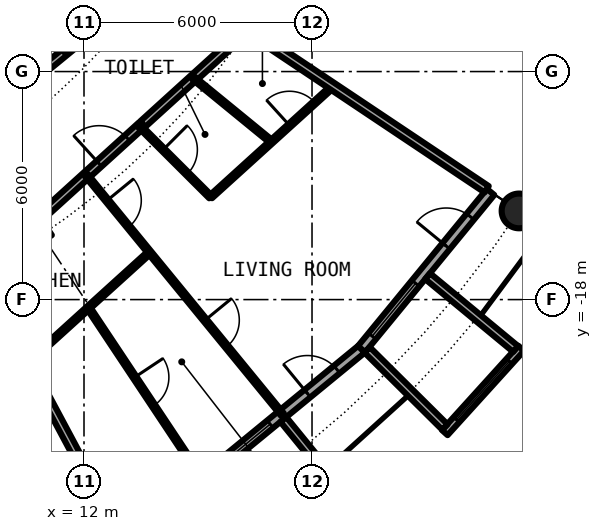
"""IFC4 building model, lengths in metres.
Left out: names, types, materials, properties, quantities, classifications, styles, units other than length and angle.
Written with IfcOpenShell. Run it as: python <this file> out.ifc"""

import sys

from ifc_helpers import new_model, si_unit, direction, frame, frame_2d, origin, origin_2d, place, context, subcontext, project, spatial, rectangle, circle, hollow_circle, extrude, element, fill, save


model = new_model("IFC4")
c1 = context("Model", 3, precision=1e-05, world=origin(), true_north=direction((0.0, 1.0)))
c2 = subcontext(c1, "Body", "Model", "MODEL_VIEW")
j1 = project(units=[si_unit("LENGTHUNIT", "METRE"), si_unit("PLANEANGLEUNIT", "RADIAN")], contexts=[c1])
p1 = place(None, origin())
s1 = spatial("IfcSite", under=j1, at=p1, CompositionType="ELEMENT")
p2 = place(p1, origin())
s2 = spatial("IfcBuilding", under=s1, at=p2, CompositionType="ELEMENT")
p3 = place(p2, frame((0.0, 0.0, 129.95)))
s3 = spatial("IfcBuildingStorey", under=s2, at=p3, CompositionType="ELEMENT", Elevation=129.95)
p4 = place(p3, frame((23.448, -15.667, 0.0), z_axis=(0.0, 0.0, 1.0), x_axis=(1.0, 0.0, 0.0)))
e1 = element("IfcColumn", 1, at=p4, inside=s3, PredefinedType="COLUMN", context=c2, shape_type="SweptSolid", body=[
    extrude(hollow_circle(Radius=0.457, WallThickness=0.04, at=origin_2d()), origin(), (0.0, 0.0, 1.0), 3.05),
])
p5 = place(p3, frame((15.167, -22.699, 0.0), z_axis=(0.0, 0.0, 1.0), x_axis=(0.773019449054, 0.634382322723, 0.0)))
e2 = element("IfcWall", 2, at=p5, inside=s3, PredefinedType="SOLIDWALL", context=c2, shape_type="SweptSolid", body=[
    extrude(rectangle(XDim=5.352, YDim=0.25, at=frame_2d((2.676, 0.0))), origin(), (0.0, 0.0, 1.0), 2.7),
])
p6 = place(p5, frame((0.441, 0.0, 0.3)))
e3 = element("IfcOpeningElement", 3, at=p6, cuts=e2, PredefinedType="OPENING", context=c2, shape_type="SweptSolid", body=[
    extrude(rectangle(XDim=1.8, YDim=2.1, at=frame_2d((0.9, 1.05))), frame((0.0, 0.135, 0.0), z_axis=(0.0, -1.0, 0.0), x_axis=(1.0, 0.0, 0.0)), (0.0, 0.0, 1.0), 0.27),
])
p7 = place(p5, frame((3.51, 0.0, 0.0)))
e4 = element("IfcOpeningElement", 4, at=p7, cuts=e2, PredefinedType="OPENING", context=c2, shape_type="SweptSolid", body=[
    extrude(rectangle(XDim=1.0, YDim=2.2, at=frame_2d((0.5, 1.1))), frame((0.0, 0.135, 0.0), z_axis=(0.0, -1.0, 0.0), x_axis=(1.0, 0.0, 0.0)), (0.0, 0.0, 1.0), 0.27),
])
p8 = place(p3, frame((17.246, -21.155, -0.03), z_axis=(0.0, 0.0, 1.0), x_axis=(0.631741648902, -0.775179004516, 0.0)))
e5 = element("IfcWall", 5, at=p8, inside=s3, PredefinedType="SOLIDWALL", context=c2, shape_type="SweptSolid", body=[
    extrude(rectangle(XDim=3.006, YDim=0.2, at=frame_2d((1.503, 0.0))), origin(), (0.0, 0.0, 1.0), 2.73),
])
p9 = place(p3, frame((19.304, -19.304, 0.0), z_axis=(0.0, 0.0, 1.0), x_axis=(0.634382322723, 0.773019449054, 0.0)))
e6 = element("IfcWall", 6, at=p9, inside=s3, PredefinedType="SOLIDWALL", context=c2, shape_type="SweptSolid", body=[
    extrude(rectangle(XDim=5.352, YDim=0.25, at=frame_2d((2.676, 0.0))), origin(), (0.0, 0.0, 1.0), 2.7),
])
p10 = place(p9, frame((0.441, 0.0, 0.3)))
e7 = element("IfcOpeningElement", 7, at=p10, cuts=e6, PredefinedType="OPENING", context=c2, shape_type="SweptSolid", body=[
    extrude(rectangle(XDim=1.8, YDim=2.1, at=frame_2d((0.9, 1.05))), frame((0.0, 0.135, 0.0), z_axis=(0.0, -1.0, 0.0), x_axis=(1.0, 0.0, 0.0)), (0.0, 0.0, 1.0), 0.27),
])
p11 = place(p9, frame((3.51, 0.0, 0.0)))
e8 = element("IfcOpeningElement", 8, at=p11, cuts=e6, PredefinedType="OPENING", context=c2, shape_type="SweptSolid", body=[
    extrude(rectangle(XDim=1.0, YDim=2.2, at=frame_2d((0.5, 1.1))), frame((0.0, 0.135, 0.0), z_axis=(0.0, -1.0, 0.0), x_axis=(1.0, 0.0, 0.0)), (0.0, 0.0, 1.0), 0.27),
])
p12 = place(p3, frame((21.493, -21.5, -0.03), z_axis=(0.0, 0.0, 1.0), x_axis=(0.671506829416, 0.740998365753, 0.0)))
e9 = element("IfcWall", 9, at=p12, inside=s3, PredefinedType="SOLIDWALL", context=c2, shape_type="SweptSolid", body=[
    extrude(rectangle(XDim=2.993, YDim=0.2, at=frame_2d((1.497, 0.0))), origin(), (0.0, 0.0, 1.0), 2.73),
])
p13 = place(p12, frame((0.457, 0.0, 0.33)))
e10 = element("IfcOpeningElement", 10, at=p13, cuts=e9, PredefinedType="OPENING", context=c2, shape_type="SweptSolid", body=[
    extrude(circle(Radius=1.04, at=frame_2d((1.04, 1.04))), frame((0.0, 0.11, 0.0), z_axis=(0.0, -1.0, 0.0), x_axis=(1.0, 0.0, 0.0)), (0.0, 0.0, 1.0), 0.22),
])
p14 = place(p3, frame((19.45, -19.323, -0.03), z_axis=(0.0, 0.0, 1.0), x_axis=(0.709727076896, -0.704476739375, 0.0)))
e11 = element("IfcWall", 11, at=p14, inside=s3, PredefinedType="SOLIDWALL", context=c2, shape_type="SweptSolid", body=[
    extrude(rectangle(XDim=2.883, YDim=0.2, at=frame_2d((1.441, 0.0))), origin(), (0.0, 0.0, 1.0), 2.73),
])
p15 = place(p3, frame((21.041, -17.384, -0.03), z_axis=(0.0, 0.0, 1.0), x_axis=(0.770784861449, -0.63709551667, 0.0)))
e12 = element("IfcWall", 12, at=p15, inside=s3, PredefinedType="SOLIDWALL", context=c2, shape_type="SweptSolid", body=[
    extrude(rectangle(XDim=3.006, YDim=0.2, at=frame_2d((1.503, 0.0))), origin(), (0.0, 0.0, 1.0), 2.73),
])
p16 = place(p3, frame((10.513, -19.668, 0.0), z_axis=(0.0, 0.0, 1.0), x_axis=(0.74092137325, 0.671591779775, 0.0)))
e13 = element("IfcWall", 13, at=p16, inside=s3, PredefinedType="PARTITIONING", context=c2, shape_type="SweptSolid", body=[
    extrude(rectangle(XDim=4.342, YDim=0.1, at=frame_2d((2.171, 0.0))), origin(), (0.0, 0.0, 1.0), 2.7),
])
p17 = place(p3, frame((15.336, -15.296, 0.0), z_axis=(0.0, 0.0, 1.0), x_axis=(0.740895789277, 0.671620003746, 0.0)))
e14 = element("IfcWall", 14, at=p17, inside=s3, PredefinedType="PARTITIONING", context=c2, shape_type="SweptSolid", body=[
    extrude(rectangle(XDim=4.331, YDim=0.1, at=frame_2d((2.166, 0.0))), origin(), (0.0, 0.0, 1.0), 2.7),
])
p18 = place(p17, frame((2.796, 0.0, 0.0)))
e15 = element("IfcOpeningElement", 15, at=p18, cuts=e14, PredefinedType="OPENING", context=c2, shape_type="SweptSolid", body=[
    extrude(rectangle(XDim=0.9, YDim=2.3, at=frame_2d((0.45, 1.15))), frame((0.0, 0.06, 0.0), z_axis=(0.0, -1.0, 0.0), x_axis=(1.0, 0.0, 0.0)), (0.0, 0.0, 1.0), 0.12),
])
p19 = place(p3, frame((9.249, -17.282, 0.0), z_axis=(0.0, 0.0, 1.0), x_axis=(0.740525495356, 0.672028266316, 0.0)))
e16 = element("IfcWall", 16, at=p19, inside=s3, PredefinedType="PARTITIONING", context=c2, shape_type="SweptSolid", body=[
    extrude(rectangle(XDim=5.753, YDim=0.2, at=frame_2d((2.876, 0.0))), origin(), (0.0, 0.0, 1.0), 2.7),
])
p20 = place(p19, frame((4.253, 0.0, 0.0)))
e17 = element("IfcOpeningElement", 17, at=p20, cuts=e16, PredefinedType="OPENING", context=c2, shape_type="SweptSolid", body=[
    extrude(rectangle(XDim=1.0, YDim=2.3, at=frame_2d((0.5, 1.15))), frame((0.0, 0.11, 0.0), z_axis=(0.0, -1.0, 0.0), x_axis=(1.0, 0.0, 0.0)), (0.0, 0.0, 1.0), 0.22),
])
p21 = place(p3, frame((13.545, -13.384, 0.0), z_axis=(0.0, 0.0, 1.0), x_axis=(0.740607766684, 0.671937598239, 0.0)))
e18 = element("IfcWall", 18, at=p21, inside=s3, PredefinedType="PARTITIONING", context=c2, shape_type="SweptSolid", body=[
    extrude(rectangle(XDim=3.555, YDim=0.2, at=frame_2d((1.778, 0.0))), origin(), (0.0, 0.0, 1.0), 2.39),
])
p22 = place(p3, frame((6.467, -15.614, 0.0), z_axis=(0.0, 0.0, 1.0), x_axis=(0.773074935257, 0.634314704605, 0.0)))
e19 = element("IfcWall", 19, at=p22, inside=s3, PredefinedType="PARTITIONING", context=c2, shape_type="SweptSolid", body=[
    extrude(rectangle(XDim=9.809, YDim=0.2, at=frame_2d((4.904, 0.0))), origin(), (0.0, 0.0, 1.0), 2.7),
])
p23 = place(p22, frame((4.407, 0.0, 0.0)))
e20 = element("IfcOpeningElement", 20, at=p23, cuts=e19, PredefinedType="OPENING", context=c2, shape_type="SweptSolid", body=[
    extrude(rectangle(XDim=1.0, YDim=2.3, at=frame_2d((0.5, 1.15))), frame((0.0, 0.11, 0.0), z_axis=(0.0, -1.0, 0.0), x_axis=(1.0, 0.0, 0.0)), (0.0, 0.0, 1.0), 0.22),
])
p24 = place(p3, frame((9.239, -17.286, 0.0), z_axis=(0.0, 0.0, 1.0), x_axis=(0.471439510802, -0.881898399848, 0.0)))
e21 = element("IfcWall", 21, at=p24, inside=s3, PredefinedType="PARTITIONING", context=c2, shape_type="SweptSolid", body=[
    extrude(rectangle(XDim=7.575, YDim=0.2, at=frame_2d((3.787, 0.0))), origin(), (0.0, 0.0, 1.0), 2.7),
])
p25 = place(p3, frame((9.683, -9.632, 0.0), z_axis=(0.0, 0.0, 1.0), x_axis=(0.708796844581, -0.705412668665, 0.0)))
e22 = element("IfcWall", 22, at=p25, inside=s3, PredefinedType="PARTITIONING", context=c2, shape_type="SweptSolid", body=[
    extrude(rectangle(XDim=2.597, YDim=0.1, at=frame_2d((1.299, 0.0))), origin(), (0.0, 0.0, 1.0), 2.7),
])
p26 = place(p25, frame((0.849, 0.0, 0.0)))
e23 = element("IfcOpeningElement", 23, at=p26, cuts=e22, PredefinedType="OPENING", context=c2, shape_type="SweptSolid", body=[
    extrude(rectangle(XDim=0.9, YDim=2.3, at=frame_2d((0.45, 1.15))), frame((0.0, 0.06, 0.0), z_axis=(0.0, -1.0, 0.0), x_axis=(1.0, 0.0, 0.0)), (0.0, 0.0, 1.0), 0.12),
])
p27 = place(p3, frame((12.062, -14.727, 0.0), z_axis=(0.0, 0.0, 1.0), x_axis=(0.633664062855, -0.773608334654, 0.0)))
e24 = element("IfcWall", 24, at=p27, inside=s3, PredefinedType="PARTITIONING", context=c2, shape_type="SweptSolid", body=[
    extrude(rectangle(XDim=8.138, YDim=0.1, at=frame_2d((4.069, 0.0))), origin(), (0.0, 0.0, 1.0), 2.7),
])
p28 = place(p27, frame((0.861, 0.0, 0.0)))
e25 = element("IfcOpeningElement", 25, at=p28, cuts=e24, PredefinedType="OPENING", context=c2, shape_type="SweptSolid", body=[
    extrude(rectangle(XDim=0.9, YDim=2.3, at=frame_2d((0.45, 1.15))), frame((0.0, 0.06, 0.0), z_axis=(0.0, -1.0, 0.0), x_axis=(1.0, 0.0, 0.0)), (0.0, 0.0, 1.0), 0.12),
])
p29 = place(p27, frame((4.931, 0.0, 0.0)))
e26 = element("IfcOpeningElement", 26, at=p29, cuts=e24, PredefinedType="OPENING", context=c2, shape_type="SweptSolid", body=[
    extrude(rectangle(XDim=0.9, YDim=2.3, at=frame_2d((0.45, 1.15))), frame((0.0, 0.06, 0.0), z_axis=(0.0, -1.0, 0.0), x_axis=(1.0, 0.0, 0.0)), (0.0, 0.0, 1.0), 0.12),
])
p30 = place(p3, frame((12.115, -18.213, 0.0), z_axis=(0.0, 0.0, 1.0), x_axis=(0.553913391217, -0.832574294, 0.0)))
e27 = element("IfcWall", 27, at=p30, inside=s3, PredefinedType="PARTITIONING", context=c2, shape_type="SweptSolid", body=[
    extrude(rectangle(XDim=5.301, YDim=0.1, at=frame_2d((2.65, 0.0))), origin(), (0.0, 0.0, 1.0), 2.7),
])
p31 = place(p30, frame((2.2, 0.0, 0.0)))
e28 = element("IfcOpeningElement", 28, at=p31, cuts=e27, PredefinedType="OPENING", context=c2, shape_type="SweptSolid", body=[
    extrude(rectangle(XDim=0.9, YDim=2.3, at=frame_2d((0.45, 1.15))), frame((0.0, 0.06, 0.0), z_axis=(0.0, -1.0, 0.0), x_axis=(1.0, 0.0, 0.0)), (0.0, 0.0, 1.0), 0.12),
])
p32 = place(p3, frame((13.474, -13.448, 0.0), z_axis=(0.0, 0.0, 1.0), x_axis=(0.707851299421, -0.706361478217, 0.0)))
e29 = element("IfcWall", 29, at=p32, inside=s3, PredefinedType="PARTITIONING", context=c2, shape_type="SweptSolid", body=[
    extrude(rectangle(XDim=2.622, YDim=0.1, at=frame_2d((1.311, 0.0))), origin(), (0.0, 0.0, 1.0), 2.7),
])
p33 = place(p32, frame((0.861, 0.0, 0.0)))
e30 = element("IfcOpeningElement", 30, at=p33, cuts=e29, PredefinedType="OPENING", context=c2, shape_type="SweptSolid", body=[
    extrude(rectangle(XDim=0.9, YDim=2.3, at=frame_2d((0.45, 1.15))), frame((0.0, 0.06, 0.0), z_axis=(0.0, -1.0, 0.0), x_axis=(1.0, 0.0, 0.0)), (0.0, 0.0, 1.0), 0.12),
])
p34 = place(p3, frame((14.882, -12.171, 0.0), z_axis=(0.0, 0.0, 1.0), x_axis=(0.774162545943, -0.632986850147, 0.0)))
e31 = element("IfcWall", 31, at=p34, inside=s3, PredefinedType="PARTITIONING", context=c2, shape_type="SweptSolid", body=[
    extrude(rectangle(XDim=2.649, YDim=0.1, at=frame_2d((1.325, 0.0))), origin(), (0.0, 0.0, 1.0), 2.7),
])
p35 = place(p3, frame((16.477, -11.009, 0.0), z_axis=(0.0, 0.0, 1.0), x_axis=(0.831467903109, -0.555572791, 0.0)))
e32 = element("IfcWall", 32, at=p35, inside=s3, PredefinedType="PARTITIONING", context=c2, shape_type="SweptSolid", body=[
    extrude(rectangle(XDim=7.358, YDim=0.2, at=frame_2d((3.679, 0.0))), origin(), (0.0, 0.0, 1.0), 2.7),
])
p36 = place(p6, origin())
e33 = element("IfcWindow", 33, at=p36, inside=s3, PartitioningType="SINGLE_PANEL", PredefinedType="WINDOW", context=c2, shape_type="SweptSolid", body=[
    extrude(rectangle(XDim=1.8, YDim=2.1, at=frame_2d((0.9, 1.05))), frame((0.0, 0.03, 0.0), z_axis=(0.0, -1.0, 0.0), x_axis=(1.0, 0.0, 0.0)), (0.0, 0.0, 1.0), 0.06),
])
fill(e3, e33)
p37 = place(p7, origin())
e34 = element("IfcDoor", 34, at=p37, inside=s3, OperationType="SINGLE_SWING_LEFT", PredefinedType="DOOR", context=c2, shape_type="SweptSolid", body=[
    extrude(rectangle(XDim=1.0, YDim=2.2, at=frame_2d((0.5, 1.1))), frame((0.0, 0.025, 0.0), z_axis=(0.0, -1.0, 0.0), x_axis=(1.0, 0.0, 0.0)), (0.0, 0.0, 1.0), 0.05),
])
fill(e4, e34)
p38 = place(p10, origin())
e35 = element("IfcWindow", 35, at=p38, inside=s3, PartitioningType="SINGLE_PANEL", PredefinedType="WINDOW", context=c2, shape_type="SweptSolid", body=[
    extrude(rectangle(XDim=1.8, YDim=2.1, at=frame_2d((0.9, 1.05))), frame((0.0, 0.03, 0.0), z_axis=(0.0, -1.0, 0.0), x_axis=(1.0, 0.0, 0.0)), (0.0, 0.0, 1.0), 0.06),
])
fill(e7, e35)
p39 = place(p13, origin())
e36 = element("IfcWindow", 36, at=p39, inside=s3, PartitioningType="SINGLE_PANEL", PredefinedType="WINDOW", context=c2, shape_type="SweptSolid", body=[
    extrude(circle(Radius=1.04, at=frame_2d((1.04, 1.04))), frame((0.0, 0.03, 0.0), z_axis=(0.0, -1.0, 0.0), x_axis=(1.0, 0.0, 0.0)), (0.0, 0.0, 1.0), 0.06),
])
fill(e10, e36)
p40 = place(p11, origin())
e37 = element("IfcDoor", 37, at=p40, inside=s3, OperationType="SINGLE_SWING_LEFT", PredefinedType="DOOR", context=c2, shape_type="SweptSolid", body=[
    extrude(rectangle(XDim=1.0, YDim=2.2, at=frame_2d((0.5, 1.1))), frame((0.0, 0.025, 0.0), z_axis=(0.0, -1.0, 0.0), x_axis=(1.0, 0.0, 0.0)), (0.0, 0.0, 1.0), 0.05),
])
fill(e8, e37)
p41 = place(p20, origin())
e38 = element("IfcDoor", 38, at=p41, inside=s3, OperationType="SINGLE_SWING_RIGHT", PredefinedType="DOOR", context=c2, shape_type="SweptSolid", body=[
    extrude(rectangle(XDim=1.0, YDim=2.3, at=frame_2d((0.5, 1.15))), frame((0.0, 0.025, 0.0), z_axis=(0.0, -1.0, 0.0), x_axis=(1.0, 0.0, 0.0)), (0.0, 0.0, 1.0), 0.05),
])
fill(e17, e38)
p42 = place(p18, origin())
e39 = element("IfcDoor", 39, at=p42, inside=s3, OperationType="SINGLE_SWING_RIGHT", PredefinedType="DOOR", context=c2, shape_type="SweptSolid", body=[
    extrude(rectangle(XDim=0.9, YDim=2.3, at=frame_2d((0.45, 1.15))), frame((0.0, 0.025, 0.0), z_axis=(0.0, -1.0, 0.0), x_axis=(1.0, 0.0, 0.0)), (0.0, 0.0, 1.0), 0.05),
])
fill(e15, e39)
p43 = place(p33, origin())
e40 = element("IfcDoor", 40, at=p43, inside=s3, OperationType="SINGLE_SWING_LEFT", PredefinedType="DOOR", context=c2, shape_type="SweptSolid", body=[
    extrude(rectangle(XDim=0.9, YDim=2.3, at=frame_2d((0.45, 1.15))), frame((0.0, 0.025, 0.0), z_axis=(0.0, -1.0, 0.0), x_axis=(1.0, 0.0, 0.0)), (0.0, 0.0, 1.0), 0.05),
])
fill(e30, e40)
p44 = place(p28, origin())
e41 = element("IfcDoor", 41, at=p44, inside=s3, OperationType="SINGLE_SWING_LEFT", PredefinedType="DOOR", context=c2, shape_type="SweptSolid", body=[
    extrude(rectangle(XDim=0.9, YDim=2.3, at=frame_2d((0.45, 1.15))), frame((0.0, 0.025, 0.0), z_axis=(0.0, -1.0, 0.0), x_axis=(1.0, 0.0, 0.0)), (0.0, 0.0, 1.0), 0.05),
])
fill(e25, e41)
p45 = place(p29, origin())
e42 = element("IfcDoor", 42, at=p45, inside=s3, OperationType="SINGLE_SWING_RIGHT", PredefinedType="DOOR", context=c2, shape_type="SweptSolid", body=[
    extrude(rectangle(XDim=0.9, YDim=2.3, at=frame_2d((0.45, 1.15))), frame((0.0, 0.025, 0.0), z_axis=(0.0, -1.0, 0.0), x_axis=(1.0, 0.0, 0.0)), (0.0, 0.0, 1.0), 0.05),
])
fill(e26, e42)
p46 = place(p31, origin())
e43 = element("IfcDoor", 43, at=p46, inside=s3, OperationType="SINGLE_SWING_LEFT", PredefinedType="DOOR", context=c2, shape_type="SweptSolid", body=[
    extrude(rectangle(XDim=0.9, YDim=2.3, at=frame_2d((0.45, 1.15))), frame((0.0, 0.025, 0.0), z_axis=(0.0, -1.0, 0.0), x_axis=(1.0, 0.0, 0.0)), (0.0, 0.0, 1.0), 0.05),
])
fill(e28, e43)
save(model, sys.argv[1])
